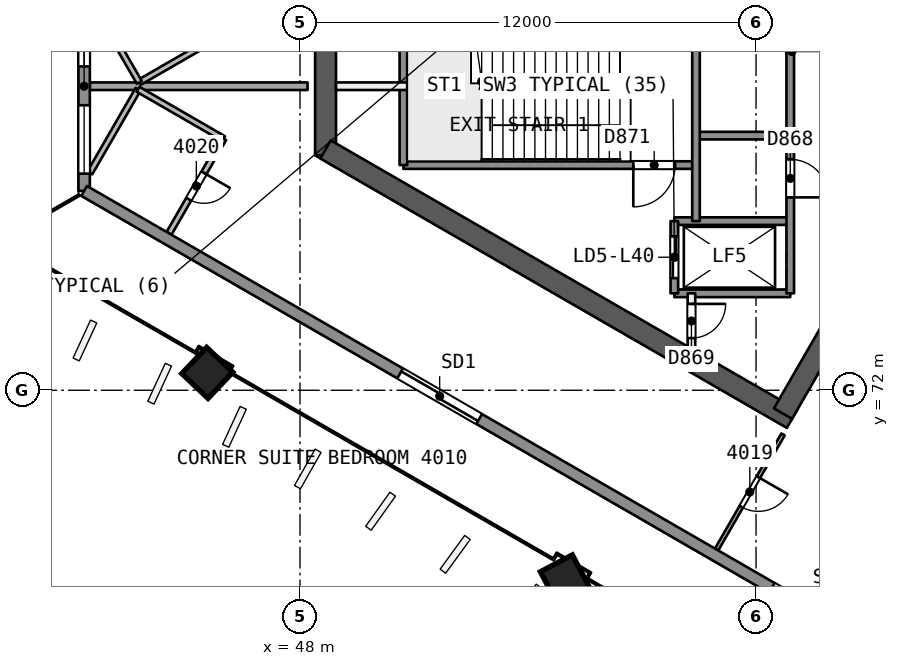
"""IFC4 building model, lengths in metres.
Left out: names, types, materials, properties, quantities, classifications, styles, units other than length and angle.
Written with IfcOpenShell. Run it as: python <this file> out.ifc"""

import sys

from ifc_helpers import new_model, si_unit, direction, frame, frame_2d, origin, origin_2d, place, context, subcontext, project, spatial, rectangle, extrude, element, fill, save


model = new_model("IFC4")
c1 = context("Model", 3, precision=1e-05, world=origin(), true_north=direction((0.0, 1.0)))
c2 = subcontext(c1, "Body", "Model", "MODEL_VIEW")
j1 = project(units=[si_unit("LENGTHUNIT", "METRE"), si_unit("PLANEANGLEUNIT", "RADIAN")], contexts=[c1])
p1 = place(None, origin())
s1 = spatial("IfcSite", under=j1, at=p1, CompositionType="ELEMENT")
p2 = place(p1, origin())
s2 = spatial("IfcBuilding", under=s1, at=p2, CompositionType="ELEMENT")
p3 = place(p2, frame((0.0, 0.0, 167.4)))
s3 = spatial("IfcBuildingStorey", under=s2, at=p3, CompositionType="ELEMENT", Elevation=167.4)
p4 = place(p3, frame((65.682, 80.0, 0.0), z_axis=(0.0, 0.0, 1.0), x_axis=(-0.500000202252, 0.866025287014, 0.0)))
e1 = element("IfcWall", 1, at=p4, inside=s3, PredefinedType="SHEAR", context=c2, shape_type="SweptSolid", body=[
    extrude(rectangle(XDim=10.221, YDim=0.55, at=frame_2d((5.111, 0.0))), origin(), (0.0, 0.0, 1.0), 3.7),
])
p5 = place(p4, frame((0.791, 0.0, 0.0)))
e2 = element("IfcOpeningElement", 2, at=p5, cuts=e1, PredefinedType="OPENING", context=c2, shape_type="SweptSolid", body=[
    extrude(rectangle(XDim=1.2, YDim=2.1, at=frame_2d((0.6, 1.05))), frame((0.0, 0.286, 0.0), z_axis=(0.0, -1.0, 0.0), x_axis=(1.0, 0.0, 0.0)), (0.0, 0.0, 1.0), 0.571),
])
p6 = place(p3, frame((48.672, 81.664, 0.0), z_axis=(0.0, 0.0, 1.0), x_axis=(0.0, -1.0, 0.0)))
e3 = element("IfcWall", 3, at=p6, inside=s3, PredefinedType="SHEAR", context=c2, shape_type="SweptSolid", body=[
    extrude(rectangle(XDim=3.487, YDim=0.55, at=frame_2d((1.743, 0.0))), origin(), (0.0, 0.0, 1.0), 3.7),
])
p7 = place(p3, frame((48.672, 78.336, 0.0), z_axis=(0.0, 0.0, 1.0), x_axis=(0.866023530946, -0.500003243837, 0.0)))
e4 = element("IfcWall", 4, at=p7, inside=s3, PredefinedType="SHEAR", context=c2, shape_type="SweptSolid", body=[
    extrude(rectangle(XDim=14.175, YDim=0.55, at=frame_2d((7.087, 0.0))), origin(), (0.0, 0.0, 1.0), 3.7),
])
p8 = place(p3, frame((60.709, 71.386, 0.0), z_axis=(0.0, 0.0, 1.0), x_axis=(0.500015938302, 0.866016201606, 0.0)))
e5 = element("IfcWall", 5, at=p8, inside=s3, PredefinedType="SHEAR", context=c2, shape_type="SweptSolid", body=[
    extrude(rectangle(XDim=10.105, YDim=0.55, at=frame_2d((5.053, 0.0))), origin(), (0.0, 0.0, 1.0), 3.7),
])
p9 = place(p8, frame((7.955, 0.0, 0.0)))
e6 = element("IfcOpeningElement", 6, at=p9, cuts=e5, PredefinedType="OPENING", context=c2, shape_type="SweptSolid", body=[
    extrude(rectangle(XDim=1.2, YDim=2.1, at=frame_2d((0.6, 1.05))), frame((0.0, 0.286, 0.0), z_axis=(0.0, -1.0, 0.0), x_axis=(1.0, 0.0, 0.0)), (0.0, 0.0, 1.0), 0.571),
])
p10 = place(p3, frame((45.526, 72.449, 0.0), z_axis=(0.028557232129, 0.006793059837, 0.999569076568), x_axis=(-0.865318806464, 0.500768292431, 0.021318547709)))
e7 = element("IfcColumn", 7, at=p10, inside=s3, PredefinedType="COLUMN", context=c2, shape_type="SweptSolid", body=[
    extrude(rectangle(XDim=0.95, YDim=0.95, at=origin_2d()), origin(), (0.0, 0.0, 1.0), 3.702),
])
p11 = place(p3, frame((54.944, 67.012, 0.0), z_axis=(0.019327242333, 0.012137244332, 0.999739538582), x_axis=(-0.865689055052, 0.500468607992, 0.010659848856)))
e8 = element("IfcColumn", 8, at=p11, inside=s3, PredefinedType="COLUMN", context=c2, shape_type="SweptSolid", body=[
    extrude(rectangle(XDim=0.95, YDim=0.95, at=origin_2d()), origin(), (0.0, 0.0, 1.0), 3.701),
])
p12 = place(p3, frame((46.023, 81.401, 0.0), z_axis=(0.0, 0.0, 1.0), x_axis=(-0.866021400173, -0.500006934395, 0.0)))
e9 = element("IfcWall", 9, at=p12, inside=s3, PredefinedType="PARTITIONING", context=c2, shape_type="SweptSolid", body=[
    extrude(rectangle(XDim=2.6, YDim=0.15, at=frame_2d((1.3, 0.0))), origin(), (0.0, 0.0, 1.0), 3.25),
])
p13 = place(p3, frame((43.771, 80.101, 0.0), z_axis=(0.0, 0.0, 1.0), x_axis=(-0.49998731371, 0.866032728093, 0.0)))
e10 = element("IfcWall", 10, at=p13, inside=s3, PredefinedType="PARTITIONING", context=c2, shape_type="SweptSolid", body=[
    extrude(rectangle(XDim=2.606, YDim=0.15, at=frame_2d((1.303, 0.0))), origin(), (0.0, 0.0, 1.0), 3.25),
])
p14 = place(p3, frame((42.468, 80.0, 0.0), z_axis=(0.0, 0.0, 1.0), x_axis=(1.0, 0.0, 0.0)))
e11 = element("IfcWall", 11, at=p14, inside=s3, PredefinedType="PARTITIONING", context=c2, shape_type="SweptSolid", body=[
    extrude(rectangle(XDim=5.73, YDim=0.2, at=frame_2d((2.865, 0.0))), origin(), (0.0, 0.0, 1.0), 3.25),
])
p15 = place(p3, frame((60.71, 70.838, 0.0), z_axis=(0.0, 0.0, 1.0), x_axis=(-0.499982229883, -0.866035663123, 0.0)))
e12 = element("IfcWall", 12, at=p15, inside=s3, PredefinedType="PARTITIONING", context=c2, shape_type="SweptSolid", body=[
    extrude(rectangle(XDim=3.498, YDim=0.1, at=frame_2d((1.749, 0.0))), origin(), (0.0, 0.0, 1.0), 3.25),
])
p16 = place(p15, frame((1.299, 0.0, 0.0)))
e13 = element("IfcOpeningElement", 13, at=p16, cuts=e12, PredefinedType="OPENING", context=c2, shape_type="SweptSolid", body=[
    extrude(rectangle(XDim=0.9, YDim=2.1, at=frame_2d((0.45, 1.05))), frame((0.0, 0.061, 0.0), z_axis=(0.0, -1.0, 0.0), x_axis=(1.0, 0.0, 0.0)), (0.0, 0.0, 1.0), 0.121),
])
p17 = place(p3, frame((42.468, 77.718, 0.0), z_axis=(0.0, 0.0, 1.0), x_axis=(0.4999525809, 0.866052779484, 0.0)))
e14 = element("IfcWall", 14, at=p17, inside=s3, PredefinedType="PARTITIONING", context=c2, shape_type="SweptSolid", body=[
    extrude(rectangle(XDim=2.541, YDim=0.15, at=frame_2d((1.271, 0.0))), origin(), (0.0, 0.0, 1.0), 3.25),
])
p18 = place(p3, frame((43.739, 79.918, 0.0), z_axis=(0.0, 0.0, 1.0), x_axis=(0.866021400173, -0.500006934395, 0.0)))
e15 = element("IfcWall", 15, at=p18, inside=s3, PredefinedType="PARTITIONING", context=c2, shape_type="SweptSolid", body=[
    extrude(rectangle(XDim=2.6, YDim=0.15, at=frame_2d((1.3, 0.0))), origin(), (0.0, 0.0, 1.0), 3.25),
])
p19 = place(p3, frame((45.99, 78.618, 0.0), z_axis=(0.0, 0.0, 1.0), x_axis=(-0.500001735503, -0.866024401789, 0.0)))
e16 = element("IfcWall", 16, at=p19, inside=s3, PredefinedType="PARTITIONING", context=c2, shape_type="SweptSolid", body=[
    extrude(rectangle(XDim=2.875, YDim=0.15, at=frame_2d((1.438, 0.0))), origin(), (0.0, 0.0, 1.0), 3.25),
])
p20 = place(p19, frame((1.038, 0.0, 0.0)))
e17 = element("IfcOpeningElement", 17, at=p20, cuts=e16, PredefinedType="OPENING", context=c2, shape_type="SweptSolid", body=[
    extrude(rectangle(XDim=0.8, YDim=2.1, at=frame_2d((0.4, 1.05))), frame((0.0, 0.085, 0.0), z_axis=(0.0, -1.0, 0.0), x_axis=(1.0, 0.0, 0.0)), (0.0, 0.0, 1.0), 0.171),
])
p21 = place(p3, frame((42.319, 77.245, 0.0), z_axis=(0.0, 0.0, 1.0), x_axis=(0.0, 1.0, 0.0)))
e18 = element("IfcWall", 18, at=p21, inside=s3, PredefinedType="SOLIDWALL", context=c2, shape_type="SweptSolid", body=[
    extrude(rectangle(XDim=5.509, YDim=0.3, at=frame_2d((2.755, 0.0))), origin(), (0.0, 0.0, 1.0), 3.25),
])
p22 = place(p21, frame((3.276, 0.0, 0.9)))
e19 = element("IfcOpeningElement", 19, at=p22, cuts=e18, PredefinedType="OPENING", context=c2, shape_type="SweptSolid", body=[
    extrude(rectangle(XDim=1.8, YDim=1.5, at=frame_2d((0.9, 0.75))), frame((0.0, 0.161, 0.0), z_axis=(0.0, -1.0, 0.0), x_axis=(1.0, 0.0, 0.0)), (0.0, 0.0, 1.0), 0.321),
])
p23 = place(p21, frame((0.454, 0.0, 0.9)))
e20 = element("IfcOpeningElement", 20, at=p23, cuts=e18, PredefinedType="OPENING", context=c2, shape_type="SweptSolid", body=[
    extrude(rectangle(XDim=1.8, YDim=1.5, at=frame_2d((0.9, 0.75))), frame((0.0, 0.161, 0.0), z_axis=(0.0, -1.0, 0.0), x_axis=(1.0, 0.0, 0.0)), (0.0, 0.0, 1.0), 0.321),
])
p24 = place(p3, frame((88.955, 50.32, 0.0), z_axis=(0.0, 0.0, 1.0), x_axis=(-0.866024017239, 0.50000240156, 0.0)))
e21 = element("IfcWall", 21, at=p24, inside=s3, PredefinedType="SOLIDWALL", context=c2, shape_type="SweptSolid", body=[
    extrude(rectangle(XDim=53.85, YDim=0.3, at=frame_2d((26.925, 0.0))), origin(), (0.0, 0.0, 1.0), 3.25),
])
p25 = place(p24, frame((30.557, 0.0, 0.0)))
e22 = element("IfcOpeningElement", 22, at=p25, cuts=e21, PredefinedType="OPENING", context=c2, shape_type="SweptSolid", body=[
    extrude(rectangle(XDim=2.4, YDim=2.4, at=frame_2d((1.2, 1.2))), frame((0.0, 0.161, 0.0), z_axis=(0.0, -1.0, 0.0), x_axis=(1.0, 0.0, 0.0)), (0.0, 0.0, 1.0), 0.321),
])
p26 = place(p24, frame((41.847, 0.0, 0.0)))
e23 = element("IfcOpeningElement", 23, at=p26, cuts=e21, PredefinedType="OPENING", context=c2, shape_type="SweptSolid", body=[
    extrude(rectangle(XDim=2.4, YDim=2.4, at=frame_2d((1.2, 1.2))), frame((0.0, 0.161, 0.0), z_axis=(0.0, -1.0, 0.0), x_axis=(1.0, 0.0, 0.0)), (0.0, 0.0, 1.0), 0.321),
])
p27 = place(p24, frame((10.349, 0.0, 0.0)))
e24 = element("IfcOpeningElement", 24, at=p27, cuts=e21, PredefinedType="OPENING", context=c2, shape_type="SweptSolid", body=[
    extrude(rectangle(XDim=2.4, YDim=2.4, at=frame_2d((1.2, 1.2))), frame((0.0, 0.161, 0.0), z_axis=(0.0, -1.0, 0.0), x_axis=(1.0, 0.0, 0.0)), (0.0, 0.0, 1.0), 0.321),
])
p28 = place(p24, frame((25.09, 0.0, 0.9)))
e25 = element("IfcOpeningElement", 25, at=p28, cuts=e21, PredefinedType="OPENING", context=c2, shape_type="SweptSolid", body=[
    extrude(rectangle(XDim=1.8, YDim=1.5, at=frame_2d((0.9, 0.75))), frame((0.0, 0.161, 0.0), z_axis=(0.0, -1.0, 0.0), x_axis=(1.0, 0.0, 0.0)), (0.0, 0.0, 1.0), 0.321),
])
p29 = place(p3, frame((50.82, 80.0, 0.0), z_axis=(0.0, 0.0, 1.0), x_axis=(-1.0, 0.0, 0.0)))
e26 = element("IfcWall", 26, at=p29, inside=s3, PredefinedType="PARTITIONING", context=c2, shape_type="SweptSolid", body=[
    extrude(rectangle(XDim=1.873, YDim=0.2, at=frame_2d((0.937, 0.0))), origin(), (0.0, 0.0, 1.0), 3.25),
])
p30 = place(p3, frame((60.9, 78.7, 0.0), z_axis=(0.0, 0.0, 1.0), x_axis=(-1.0, 0.0, 0.0)))
e27 = element("IfcWall", 27, at=p30, inside=s3, PredefinedType="SOLIDWALL", context=c2, shape_type="SweptSolid", body=[
    extrude(rectangle(XDim=2.48, YDim=0.2, at=frame_2d((1.24, 0.0))), origin(), (0.0, 0.0, 1.0), 3.25),
])
p31 = place(p3, frame((58.42, 77.925, 0.0), z_axis=(0.0, 0.0, 1.0), x_axis=(-1.0, 0.0, 0.0)))
e28 = element("IfcWall", 28, at=p31, inside=s3, PredefinedType="SOLIDWALL", context=c2, shape_type="SweptSolid", body=[
    extrude(rectangle(XDim=7.7, YDim=0.2, at=frame_2d((3.85, 0.0))), origin(), (0.0, 0.0, 1.0), 3.25),
])
p32 = place(p31, frame((0.55, 0.0, 0.0)))
e29 = element("IfcOpeningElement", 29, at=p32, cuts=e28, PredefinedType="OPENING", context=c2, shape_type="SweptSolid", body=[
    extrude(rectangle(XDim=1.1, YDim=2.1, at=frame_2d((0.55, 1.05))), frame((0.0, 0.11, 0.0), z_axis=(0.0, -1.0, 0.0), x_axis=(1.0, 0.0, 0.0)), (0.0, 0.0, 1.0), 0.221),
])
for number, where, z_axis, x_axis in (
    (30, (60.9, 76.45, 0.0), (0.0, 0.0, 1.0), (-1.0, 0.0, 0.0)),
    (31, (60.9, 74.55, 0.0), (0.0, 0.0, 1.0), (-1.0, 0.0, 0.0)),
):
    element("IfcWall", number, at=place(p3, frame(where, z_axis=z_axis, x_axis=x_axis)), inside=s3, PredefinedType="SOLIDWALL", context=c2, shape_type="SweptSolid", body=[
        extrude(rectangle(XDim=3.05, YDim=0.2, at=frame_2d((1.525, 0.0))), origin(), (0.0, 0.0, 1.0), 3.25),
    ])
p33 = place(p3, frame((60.9, 85.45, 0.0), z_axis=(0.0, 0.0, 1.0), x_axis=(0.0, -1.0, 0.0)))
e32 = element("IfcWall", 32, at=p33, inside=s3, PredefinedType="SOLIDWALL", context=c2, shape_type="SweptSolid", body=[
    extrude(rectangle(XDim=10.9, YDim=0.2, at=frame_2d((5.45, 0.0))), origin(), (0.0, 0.0, 1.0), 3.25),
])
p34 = place(p33, frame((2.875, 0.0, 0.0)))
e33 = element("IfcOpeningElement", 33, at=p34, cuts=e32, PredefinedType="OPENING", context=c2, shape_type="SweptSolid", body=[
    extrude(rectangle(XDim=1.0, YDim=2.1, at=frame_2d((0.5, 1.05))), frame((0.0, 0.11, 0.0), z_axis=(0.0, -1.0, 0.0), x_axis=(1.0, 0.0, 0.0)), (0.0, 0.0, 1.0), 0.221),
])
p35 = place(p33, frame((7.375, 0.0, 0.0)))
e34 = element("IfcOpeningElement", 34, at=p35, cuts=e32, PredefinedType="OPENING", context=c2, shape_type="SweptSolid", body=[
    extrude(rectangle(XDim=1.0, YDim=2.1, at=frame_2d((0.5, 1.05))), frame((0.0, 0.11, 0.0), z_axis=(0.0, -1.0, 0.0), x_axis=(1.0, 0.0, 0.0)), (0.0, 0.0, 1.0), 0.221),
])
p36 = place(p3, frame((58.42, 86.974, 0.0), z_axis=(0.0, 0.0, 1.0), x_axis=(0.0, -1.0, 0.0)))
e35 = element("IfcWall", 35, at=p36, inside=s3, PredefinedType="SOLIDWALL", context=c2, shape_type="SweptSolid", body=[
    extrude(rectangle(XDim=10.524, YDim=0.2, at=frame_2d((5.262, 0.0))), origin(), (0.0, 0.0, 1.0), 3.25),
])
p37 = place(p36, frame((0.312, 0.0, 0.0)))
e36 = element("IfcOpeningElement", 36, at=p37, cuts=e35, PredefinedType="OPENING", context=c2, shape_type="SweptSolid", body=[
    extrude(rectangle(XDim=0.9, YDim=2.1, at=frame_2d((0.45, 1.05))), frame((0.0, 0.11, 0.0), z_axis=(0.0, -1.0, 0.0), x_axis=(1.0, 0.0, 0.0)), (0.0, 0.0, 1.0), 0.221),
])
p38 = place(p3, frame((58.3, 74.55, 0.0), z_axis=(0.0, 0.0, 1.0), x_axis=(0.0, -1.0, 0.0)))
e37 = element("IfcWall", 37, at=p38, inside=s3, PredefinedType="PARTITIONING", context=c2, shape_type="SweptSolid", body=[
    extrude(rectangle(XDim=1.455, YDim=0.2, at=frame_2d((0.728, 0.0))), origin(), (0.0, 0.0, 1.0), 3.25),
])
p39 = place(p38, frame((0.278, 0.0, 0.0)))
e38 = element("IfcOpeningElement", 38, at=p39, cuts=e37, PredefinedType="OPENING", context=c2, shape_type="SweptSolid", body=[
    extrude(rectangle(XDim=0.9, YDim=2.1, at=frame_2d((0.45, 1.05))), frame((0.0, 0.11, 0.0), z_axis=(0.0, -1.0, 0.0), x_axis=(1.0, 0.0, 0.0)), (0.0, 0.0, 1.0), 0.221),
])
p40 = place(p3, frame((57.85, 76.45, 0.0), z_axis=(0.0, 0.0, 1.0), x_axis=(0.0, -1.0, 0.0)))
e39 = element("IfcWall", 39, at=p40, inside=s3, PredefinedType="SOLIDWALL", context=c2, shape_type="SweptSolid", body=[
    extrude(rectangle(XDim=1.9, YDim=0.2, at=frame_2d((0.95, 0.0))), origin(), (0.0, 0.0, 1.0), 3.25),
])
p41 = place(p40, frame((0.4, 0.0, 0.0)))
e40 = element("IfcOpeningElement", 40, at=p41, cuts=e39, PredefinedType="OPENING", context=c2, shape_type="SweptSolid", body=[
    extrude(rectangle(XDim=1.1, YDim=2.1, at=frame_2d((0.55, 1.05))), frame((0.0, 0.11, 0.0), z_axis=(0.0, -1.0, 0.0), x_axis=(1.0, 0.0, 0.0)), (0.0, 0.0, 1.0), 0.221),
])
p42 = place(p3, frame((50.72, 82.075, 0.0), z_axis=(0.0, 0.0, 1.0), x_axis=(0.0, -1.0, 0.0)))
e41 = element("IfcWall", 41, at=p42, inside=s3, PredefinedType="SOLIDWALL", context=c2, shape_type="SweptSolid", body=[
    extrude(rectangle(XDim=4.15, YDim=0.2, at=frame_2d((2.075, 0.0))), origin(), (0.0, 0.0, 1.0), 3.25),
])
p43 = place(p16, origin())
e42 = element("IfcDoor", 42, at=p43, inside=s3, OperationType="SINGLE_SWING_LEFT", PredefinedType="NOTDEFINED", context=c2, shape_type="SweptSolid", body=[
    extrude(rectangle(XDim=0.9, YDim=2.1, at=frame_2d((0.45, 1.05))), frame((0.0, 0.025, 0.0), z_axis=(0.0, -1.0, 0.0), x_axis=(1.0, 0.0, 0.0)), (0.0, 0.0, 1.0), 0.05),
])
fill(e13, e42)
p44 = place(p20, origin())
e43 = element("IfcDoor", 43, at=p44, inside=s3, OperationType="SINGLE_SWING_LEFT", PredefinedType="NOTDEFINED", context=c2, shape_type="SweptSolid", body=[
    extrude(rectangle(XDim=0.8, YDim=2.1, at=frame_2d((0.4, 1.05))), frame((0.0, 0.025, 0.0), z_axis=(0.0, -1.0, 0.0), x_axis=(1.0, 0.0, 0.0)), (0.0, 0.0, 1.0), 0.05),
])
fill(e17, e43)
p45 = place(p22, origin())
e44 = element("IfcWindow", 44, at=p45, inside=s3, PartitioningType="SINGLE_PANEL", PredefinedType="WINDOW", context=c2, shape_type="SweptSolid", body=[
    extrude(rectangle(XDim=1.8, YDim=1.5, at=frame_2d((0.9, 0.75))), frame((0.0, 0.03, 0.0), z_axis=(0.0, -1.0, 0.0), x_axis=(1.0, 0.0, 0.0)), (0.0, 0.0, 1.0), 0.06),
])
fill(e19, e44)
p46 = place(p23, origin())
e45 = element("IfcWindow", 45, at=p46, inside=s3, PartitioningType="SINGLE_PANEL", PredefinedType="WINDOW", context=c2, shape_type="SweptSolid", body=[
    extrude(rectangle(XDim=1.8, YDim=1.5, at=frame_2d((0.9, 0.75))), frame((0.0, 0.03, 0.0), z_axis=(0.0, -1.0, 0.0), x_axis=(1.0, 0.0, 0.0)), (0.0, 0.0, 1.0), 0.06),
])
fill(e20, e45)
p47 = place(p26, origin())
e46 = element("IfcDoor", 46, at=p47, inside=s3, OperationType="SLIDING_TO_RIGHT", PredefinedType="NOTDEFINED", context=c2, shape_type="SweptSolid", body=[
    extrude(rectangle(XDim=2.4, YDim=2.4, at=frame_2d((1.2, 1.2))), frame((0.0, 0.025, 0.0), z_axis=(0.0, -1.0, 0.0), x_axis=(1.0, 0.0, 0.0)), (0.0, 0.0, 1.0), 0.05),
])
fill(e23, e46)
p48 = place(p41, origin())
e47 = element("IfcDoor", 47, at=p48, inside=s3, OperationType="SLIDING_TO_RIGHT", PredefinedType="NOTDEFINED", context=c2, shape_type="SweptSolid", body=[
    extrude(rectangle(XDim=1.1, YDim=2.1, at=frame_2d((0.55, 1.05))), frame((0.0, 0.025, 0.0), z_axis=(0.0, -1.0, 0.0), x_axis=(1.0, 0.0, 0.0)), (0.0, 0.0, 1.0), 0.05),
])
fill(e40, e47)
p49 = place(p35, origin())
e48 = element("IfcDoor", 48, at=p49, inside=s3, OperationType="SINGLE_SWING_RIGHT", PredefinedType="NOTDEFINED", context=c2, shape_type="SweptSolid", body=[
    extrude(rectangle(XDim=1.0, YDim=2.1, at=frame_2d((0.5, 1.05))), frame((0.0, 0.025, 0.0), z_axis=(0.0, -1.0, 0.0), x_axis=(1.0, 0.0, 0.0)), (0.0, 0.0, 1.0), 0.05),
])
fill(e34, e48)
p50 = place(p39, origin())
e49 = element("IfcDoor", 49, at=p50, inside=s3, OperationType="SINGLE_SWING_LEFT", PredefinedType="NOTDEFINED", context=c2, shape_type="SweptSolid", body=[
    extrude(rectangle(XDim=0.9, YDim=2.1, at=frame_2d((0.45, 1.05))), frame((0.0, 0.025, 0.0), z_axis=(0.0, -1.0, 0.0), x_axis=(1.0, 0.0, 0.0)), (0.0, 0.0, 1.0), 0.05),
])
fill(e38, e49)
p51 = place(p32, origin())
e50 = element("IfcDoor", 50, at=p51, inside=s3, OperationType="SINGLE_SWING_RIGHT", PredefinedType="NOTDEFINED", context=c2, shape_type="SweptSolid", body=[
    extrude(rectangle(XDim=1.1, YDim=2.1, at=frame_2d((0.55, 1.05))), frame((0.0, 0.025, 0.0), z_axis=(0.0, -1.0, 0.0), x_axis=(1.0, 0.0, 0.0)), (0.0, 0.0, 1.0), 0.05),
])
fill(e29, e50)
save(model, sys.argv[1])
